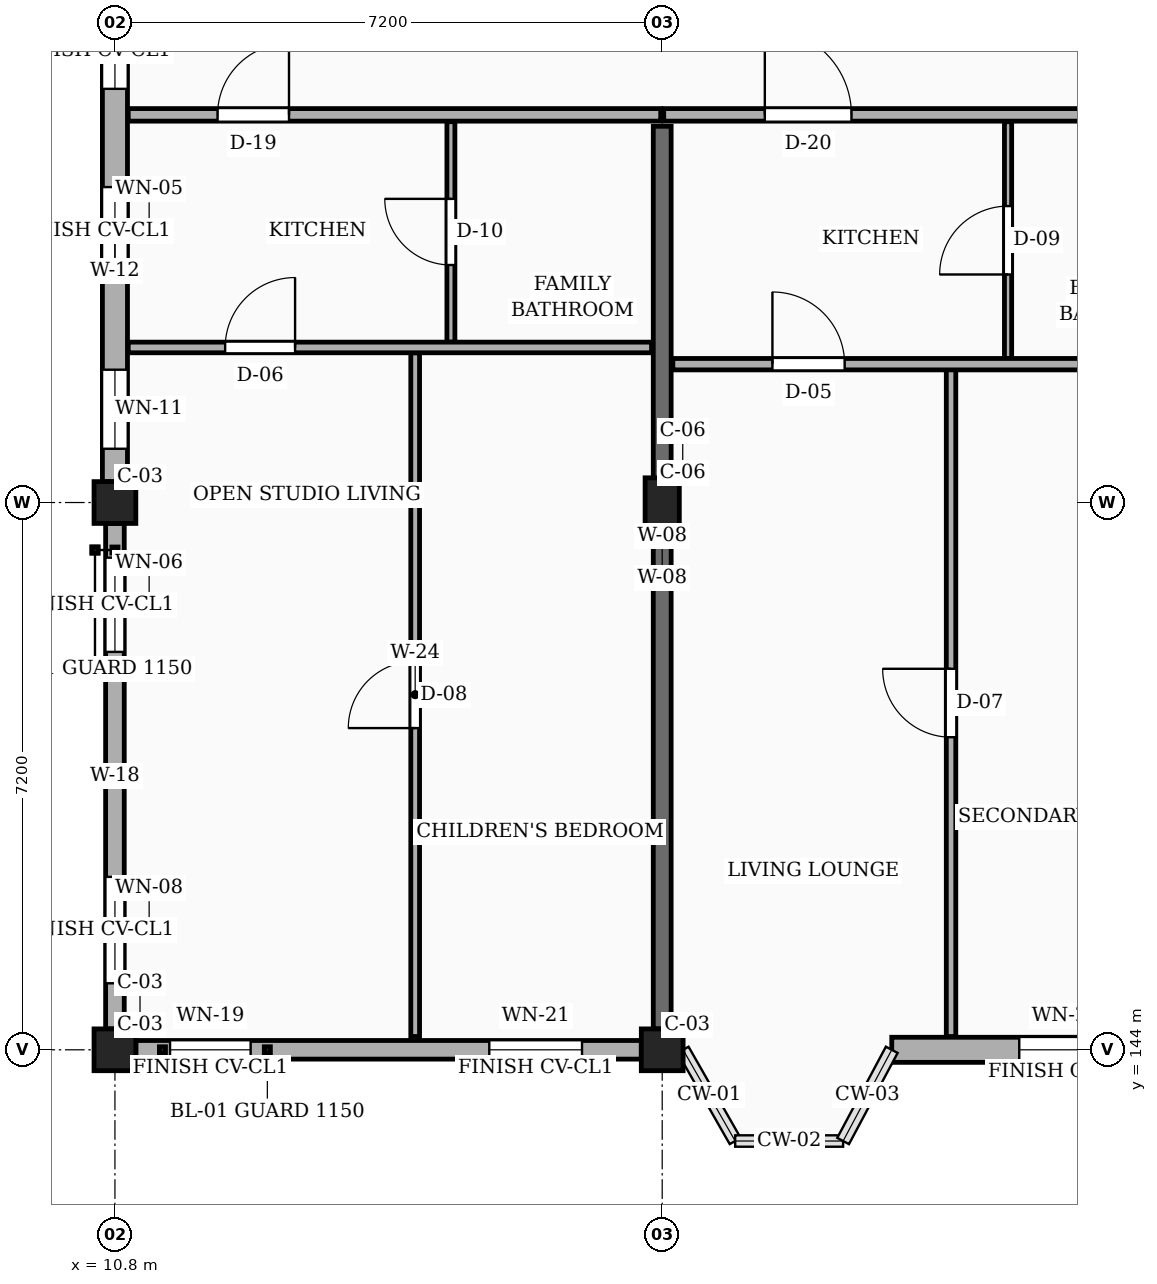
"""IFC4 building model, lengths in metres.
Left out: names, types, materials, properties, quantities, classifications, styles, units other than length and angle.
Written with IfcOpenShell. Run it as: python <this file> out.ifc"""

import sys

from ifc_helpers import new_model, si_unit, direction, frame, frame_2d, origin, origin_2d, place, context, subcontext, project, spatial, rectangle, extrude, element, fill, save


model = new_model("IFC4")
c1 = context("Model", 3, precision=1e-05, world=origin(), true_north=direction((0.0, 1.0)))
c2 = subcontext(c1, "Body", "Model", "MODEL_VIEW")
j1 = project(units=[si_unit("LENGTHUNIT", "METRE"), si_unit("PLANEANGLEUNIT", "RADIAN")], contexts=[c1])
p1 = place(None, origin())
s1 = spatial("IfcSite", under=j1, at=p1, CompositionType="ELEMENT")
p2 = place(p1, origin())
s2 = spatial("IfcBuilding", under=s1, at=p2, CompositionType="ELEMENT")
p3 = place(p2, frame((0.0, 0.0, 20.25)))
s3 = spatial("IfcBuildingStorey", under=s2, at=p3, CompositionType="ELEMENT", Elevation=20.25)
for number, where, z_axis, x_axis in (
    (1, (10.8, 144.0, 0.0), (0.0, 0.0, 1.0), (1.0, 0.0, 0.0)),
    (2, (10.8, 151.2, 0.0), (0.0, 0.0, 1.0), (1.0, 0.0, 0.0)),
    (3, (18.0, 144.0, 0.0), (0.0, 0.0, 1.0), (1.0, 0.0, 0.0)),
):
    element("IfcColumn", number, at=place(p3, frame(where, z_axis=z_axis, x_axis=x_axis)), inside=s3, PredefinedType="COLUMN", context=c2, shape_type="SweptSolid", body=[
        extrude(rectangle(XDim=0.55, YDim=0.55, at=origin_2d()), origin(), (0.0, 0.0, 1.0), 3.15),
    ])
p4 = place(p3, frame((18.0, 151.2, 0.0), z_axis=(0.0, 0.0, 1.0), x_axis=(1.0, 0.0, 0.0)))
e4 = element("IfcColumn", 4, at=p4, inside=s3, PredefinedType="COLUMN", context=c2, shape_type="SweptSolid", body=[
    extrude(rectangle(XDim=0.45, YDim=0.65, at=origin_2d()), origin(), (0.0, 0.0, 1.0), 3.15),
])
p5 = place(p3, frame((18.0, 144.275, 0.0), z_axis=(0.0, 0.0, 1.0), x_axis=(0.0, 1.0, 0.0)))
e5 = element("IfcWall", 5, at=p5, inside=s3, PredefinedType="SOLIDWALL", context=c2, shape_type="SweptSolid", body=[
    extrude(rectangle(XDim=11.875, YDim=0.235, at=frame_2d((5.938, 0.0))), origin(), (0.0, 0.0, 1.0), 2.185),
])
p6 = place(p3, frame((11.075, 144.0, 0.0), z_axis=(0.0, 0.0, 1.0), x_axis=(1.0, 0.0, 0.0)))
e6 = element("IfcWall", 6, at=p6, inside=s3, PredefinedType="SOLIDWALL", context=c2, shape_type="SweptSolid", body=[
    extrude(rectangle(XDim=6.65, YDim=0.245, at=frame_2d((3.325, 0.0))), origin(), (0.0, 0.0, 1.0), 2.455),
])
p7 = place(p6, frame((0.45, 0.0, 0.78)))
e7 = element("IfcOpeningElement", 7, at=p7, cuts=e6, PredefinedType="OPENING", context=c2, shape_type="SweptSolid", body=[
    extrude(rectangle(XDim=1.06, YDim=1.36, at=frame_2d((0.53, 0.68))), frame((0.0, 0.133, 0.0), z_axis=(0.0, -1.0, 0.0), x_axis=(1.0, 0.0, 0.0)), (0.0, 0.0, 1.0), 0.265),
])
p8 = place(p6, frame((4.65, 0.0, 0.78)))
e8 = element("IfcOpeningElement", 8, at=p8, cuts=e6, PredefinedType="OPENING", context=c2, shape_type="SweptSolid", body=[
    extrude(rectangle(XDim=1.22, YDim=1.36, at=frame_2d((0.61, 0.68))), frame((0.0, 0.133, 0.0), z_axis=(0.0, -1.0, 0.0), x_axis=(1.0, 0.0, 0.0)), (0.0, 0.0, 1.0), 0.265),
])
p9 = place(p3, frame((21.02, 144.0, 0.0), z_axis=(0.0, 0.0, 1.0), x_axis=(1.0, 0.0, 0.0)))
e9 = element("IfcWall", 9, at=p9, inside=s3, PredefinedType="SOLIDWALL", context=c2, shape_type="SweptSolid", body=[
    extrude(rectangle(XDim=3.905, YDim=0.33, at=frame_2d((1.953, 0.0))), origin(), (0.0, 0.0, 1.0), 2.455),
])
p10 = place(p9, frame((1.677, 0.0, 0.78)))
e10 = element("IfcOpeningElement", 10, at=p10, cuts=e9, PredefinedType="OPENING", context=c2, shape_type="SweptSolid", body=[
    extrude(rectangle(XDim=1.22, YDim=1.36, at=frame_2d((0.61, 0.68))), frame((0.0, 0.175, 0.0), z_axis=(0.0, -1.0, 0.0), x_axis=(1.0, 0.0, 0.0)), (0.0, 0.0, 1.0), 0.35),
])
p11 = place(p3, frame((10.8, 158.125, 0.0), z_axis=(0.0, 0.0, 1.0), x_axis=(0.0, -1.0, 0.0)))
e11 = element("IfcWall", 11, at=p11, inside=s3, PredefinedType="SOLIDWALL", context=c2, shape_type="SweptSolid", body=[
    extrude(rectangle(XDim=6.65, YDim=0.33, at=frame_2d((3.325, 0.0))), origin(), (0.0, 0.0, 1.0), 2.455),
])
p12 = place(p11, frame((0.482, 0.0, 0.78)))
e12 = element("IfcOpeningElement", 12, at=p12, cuts=e11, PredefinedType="OPENING", context=c2, shape_type="SweptSolid", body=[
    extrude(rectangle(XDim=1.0, YDim=1.15, at=frame_2d((0.5, 0.575))), frame((0.0, 0.175, 0.0), z_axis=(0.0, -1.0, 0.0), x_axis=(1.0, 0.0, 0.0)), (0.0, 0.0, 1.0), 0.35),
])
p13 = place(p11, frame((2.775, 0.0, 0.78)))
e13 = element("IfcOpeningElement", 13, at=p13, cuts=e11, PredefinedType="OPENING", context=c2, shape_type="SweptSolid", body=[
    extrude(rectangle(XDim=1.16, YDim=1.15, at=frame_2d((0.58, 0.575))), frame((0.0, 0.175, 0.0), z_axis=(0.0, -1.0, 0.0), x_axis=(1.0, 0.0, 0.0)), (0.0, 0.0, 1.0), 0.35),
])
p14 = place(p11, frame((5.177, 0.0, 0.78)))
e14 = element("IfcOpeningElement", 14, at=p14, cuts=e11, PredefinedType="OPENING", context=c2, shape_type="SweptSolid", body=[
    extrude(rectangle(XDim=1.04, YDim=1.26, at=frame_2d((0.52, 0.63))), frame((0.0, 0.175, 0.0), z_axis=(0.0, -1.0, 0.0), x_axis=(1.0, 0.0, 0.0)), (0.0, 0.0, 1.0), 0.35),
])
p15 = place(p3, frame((10.8, 150.925, 0.0), z_axis=(0.0, 0.0, 1.0), x_axis=(0.0, -1.0, 0.0)))
e15 = element("IfcWall", 15, at=p15, inside=s3, PredefinedType="SOLIDWALL", context=c2, shape_type="SweptSolid", body=[
    extrude(rectangle(XDim=6.65, YDim=0.245, at=frame_2d((3.325, 0.0))), origin(), (0.0, 0.0, 1.0), 2.455),
])
p16 = place(p15, frame((0.45, 0.0, 0.78)))
e16 = element("IfcOpeningElement", 16, at=p16, cuts=e15, PredefinedType="OPENING", context=c2, shape_type="SweptSolid", body=[
    extrude(rectangle(XDim=1.24, YDim=1.15, at=frame_2d((0.62, 0.575))), frame((0.0, 0.133, 0.0), z_axis=(0.0, -1.0, 0.0), x_axis=(1.0, 0.0, 0.0)), (0.0, 0.0, 1.0), 0.265),
])
p17 = place(p15, frame((4.65, 0.0, 0.78)))
e17 = element("IfcOpeningElement", 17, at=p17, cuts=e15, PredefinedType="OPENING", context=c2, shape_type="SweptSolid", body=[
    extrude(rectangle(XDim=1.4, YDim=1.15, at=frame_2d((0.7, 0.575))), frame((0.0, 0.133, 0.0), z_axis=(0.0, -1.0, 0.0), x_axis=(1.0, 0.0, 0.0)), (0.0, 0.0, 1.0), 0.265),
])
p18 = place(p3, frame((10.975, 156.3, 0.0), z_axis=(0.0, 0.0, 1.0), x_axis=(1.0, 0.0, 0.0)))
e18 = element("IfcWall", 18, at=p18, inside=s3, PredefinedType="PARTITIONING", context=c2, shape_type="SweptSolid", body=[
    extrude(rectangle(XDim=7.005, YDim=0.165, at=frame_2d((3.502, 0.0))), origin(), (0.0, 0.0, 1.0), 2.32),
])
p19 = place(p18, frame((1.175, 0.0, 0.0)))
e19 = element("IfcOpeningElement", 19, at=p19, cuts=e18, PredefinedType="OPENING", context=c2, shape_type="SweptSolid", body=[
    extrude(rectangle(XDim=0.94, YDim=2.12, at=frame_2d((0.47, 1.06))), frame((0.0, 0.093, 0.0), z_axis=(0.0, -1.0, 0.0), x_axis=(1.0, 0.0, 0.0)), (0.0, 0.0, 1.0), 0.185),
])
p20 = place(p3, frame((18.02, 156.3, 0.0), z_axis=(0.0, 0.0, 1.0), x_axis=(1.0, 0.0, 0.0)))
e20 = element("IfcWall", 20, at=p20, inside=s3, PredefinedType="PARTITIONING", context=c2, shape_type="SweptSolid", body=[
    extrude(rectangle(XDim=7.16, YDim=0.165, at=frame_2d((3.58, 0.0))), origin(), (0.0, 0.0, 1.0), 2.32),
])
p21 = place(p20, frame((1.33, 0.0, 0.0)))
e21 = element("IfcOpeningElement", 21, at=p21, cuts=e20, PredefinedType="OPENING", context=c2, shape_type="SweptSolid", body=[
    extrude(rectangle(XDim=1.14, YDim=2.18, at=frame_2d((0.57, 1.09))), frame((0.0, 0.093, 0.0), z_axis=(0.0, -1.0, 0.0), x_axis=(1.0, 0.0, 0.0)), (0.0, 0.0, 1.0), 0.185),
])
p22 = place(p3, frame((14.75, 144.175, 0.0), z_axis=(0.0, 0.0, 1.0), x_axis=(0.0, 1.0, 0.0)))
e22 = element("IfcWall", 22, at=p22, inside=s3, PredefinedType="PARTITIONING", context=c2, shape_type="SweptSolid", body=[
    extrude(rectangle(XDim=8.995, YDim=0.115, at=frame_2d((4.498, 0.0))), origin(), (0.0, 0.0, 1.0), 2.32),
])
p23 = place(p22, frame((4.058, 0.0, 0.0)))
e23 = element("IfcOpeningElement", 23, at=p23, cuts=e22, PredefinedType="OPENING", context=c2, shape_type="SweptSolid", body=[
    extrude(rectangle(XDim=0.88, YDim=2.08, at=frame_2d((0.44, 1.04))), frame((0.0, 0.067, 0.0), z_axis=(0.0, -1.0, 0.0), x_axis=(1.0, 0.0, 0.0)), (0.0, 0.0, 1.0), 0.135),
])
p24 = place(p3, frame((15.22, 153.31, 0.0), z_axis=(0.0, 0.0, 1.0), x_axis=(0.0, 1.0, 0.0)))
e24 = element("IfcWall", 24, at=p24, inside=s3, PredefinedType="PARTITIONING", context=c2, shape_type="SweptSolid", body=[
    extrude(rectangle(XDim=2.9, YDim=0.105, at=frame_2d((1.45, 0.0))), origin(), (0.0, 0.0, 1.0), 2.32),
])
p25 = place(p24, frame((1.015, 0.0, 0.0)))
e25 = element("IfcOpeningElement", 25, at=p25, cuts=e24, PredefinedType="OPENING", context=c2, shape_type="SweptSolid", body=[
    extrude(rectangle(XDim=0.87, YDim=2.05, at=frame_2d((0.435, 1.025))), frame((0.0, 0.062, 0.0), z_axis=(0.0, -1.0, 0.0), x_axis=(1.0, 0.0, 0.0)), (0.0, 0.0, 1.0), 0.125),
])
p26 = place(p3, frame((10.975, 153.24, 0.0), z_axis=(0.0, 0.0, 1.0), x_axis=(1.0, 0.0, 0.0)))
e26 = element("IfcWall", 26, at=p26, inside=s3, PredefinedType="PARTITIONING", context=c2, shape_type="SweptSolid", body=[
    extrude(rectangle(XDim=6.885, YDim=0.14, at=frame_2d((3.442, 0.0))), origin(), (0.0, 0.0, 1.0), 2.32),
])
p27 = place(p26, frame((1.275, 0.0, 0.0)))
e27 = element("IfcOpeningElement", 27, at=p27, cuts=e26, PredefinedType="OPENING", context=c2, shape_type="SweptSolid", body=[
    extrude(rectangle(XDim=0.92, YDim=2.1, at=frame_2d((0.46, 1.05))), frame((0.0, 0.08, 0.0), z_axis=(0.0, -1.0, 0.0), x_axis=(1.0, 0.0, 0.0)), (0.0, 0.0, 1.0), 0.16),
])
p28 = place(p3, frame((21.8, 144.175, 0.0), z_axis=(0.0, 0.0, 1.0), x_axis=(0.0, 1.0, 0.0)))
e28 = element("IfcWall", 28, at=p28, inside=s3, PredefinedType="PARTITIONING", context=c2, shape_type="SweptSolid", body=[
    extrude(rectangle(XDim=8.775, YDim=0.125, at=frame_2d((4.387, 0.0))), origin(), (0.0, 0.0, 1.0), 2.32),
])
p29 = place(p28, frame((3.938, 0.0, 0.0)))
e29 = element("IfcOpeningElement", 29, at=p29, cuts=e28, PredefinedType="OPENING", context=c2, shape_type="SweptSolid", body=[
    extrude(rectangle(XDim=0.9, YDim=2.1, at=frame_2d((0.45, 1.05))), frame((0.0, 0.073, 0.0), z_axis=(0.0, -1.0, 0.0), x_axis=(1.0, 0.0, 0.0)), (0.0, 0.0, 1.0), 0.145),
])
p30 = place(p3, frame((22.55, 153.09, 0.0), z_axis=(0.0, 0.0, 1.0), x_axis=(0.0, 1.0, 0.0)))
e30 = element("IfcWall", 30, at=p30, inside=s3, PredefinedType="PARTITIONING", context=c2, shape_type="SweptSolid", body=[
    extrude(rectangle(XDim=3.12, YDim=0.095, at=frame_2d((1.56, 0.0))), origin(), (0.0, 0.0, 1.0), 2.32),
])
p31 = place(p30, frame((1.11, 0.0, 0.0)))
e31 = element("IfcOpeningElement", 31, at=p31, cuts=e30, PredefinedType="OPENING", context=c2, shape_type="SweptSolid", body=[
    extrude(rectangle(XDim=0.9, YDim=2.05, at=frame_2d((0.45, 1.025))), frame((0.0, 0.058, 0.0), z_axis=(0.0, -1.0, 0.0), x_axis=(1.0, 0.0, 0.0)), (0.0, 0.0, 1.0), 0.115),
])
p32 = place(p3, frame((18.14, 153.02, 0.0), z_axis=(0.0, 0.0, 1.0), x_axis=(1.0, 0.0, 0.0)))
e32 = element("IfcWall", 32, at=p32, inside=s3, PredefinedType="PARTITIONING", context=c2, shape_type="SweptSolid", body=[
    extrude(rectangle(XDim=6.92, YDim=0.15, at=frame_2d((3.46, 0.0))), origin(), (0.0, 0.0, 1.0), 2.32),
])
p33 = place(p32, frame((1.31, 0.0, 0.0)))
e33 = element("IfcOpeningElement", 33, at=p33, cuts=e32, PredefinedType="OPENING", context=c2, shape_type="SweptSolid", body=[
    extrude(rectangle(XDim=0.95, YDim=2.1, at=frame_2d((0.475, 1.05))), frame((0.0, 0.085, 0.0), z_axis=(0.0, -1.0, 0.0), x_axis=(1.0, 0.0, 0.0)), (0.0, 0.0, 1.0), 0.17),
])
p34 = place(p7, origin())
e34 = element("IfcWindow", 34, at=p34, inside=s3, PartitioningType="SINGLE_PANEL", PredefinedType="WINDOW", context=c2, shape_type="SweptSolid", body=[
    extrude(rectangle(XDim=1.06, YDim=1.36, at=frame_2d((0.53, 0.68))), frame((0.0, 0.03, 0.0), z_axis=(0.0, -1.0, 0.0), x_axis=(1.0, 0.0, 0.0)), (0.0, 0.0, 1.0), 0.06),
])
fill(e7, e34)
p35 = place(p8, origin())
e35 = element("IfcWindow", 35, at=p35, inside=s3, PartitioningType="SINGLE_PANEL", PredefinedType="WINDOW", context=c2, shape_type="SweptSolid", body=[
    extrude(rectangle(XDim=1.22, YDim=1.36, at=frame_2d((0.61, 0.68))), frame((0.0, 0.03, 0.0), z_axis=(0.0, -1.0, 0.0), x_axis=(1.0, 0.0, 0.0)), (0.0, 0.0, 1.0), 0.06),
])
fill(e8, e35)
p36 = place(p10, origin())
e36 = element("IfcWindow", 36, at=p36, inside=s3, PartitioningType="SINGLE_PANEL", PredefinedType="WINDOW", context=c2, shape_type="SweptSolid", body=[
    extrude(rectangle(XDim=1.22, YDim=1.36, at=frame_2d((0.61, 0.68))), frame((0.0, 0.03, 0.0), z_axis=(0.0, -1.0, 0.0), x_axis=(1.0, 0.0, 0.0)), (0.0, 0.0, 1.0), 0.06),
])
fill(e10, e36)
p37 = place(p12, origin())
e37 = element("IfcWindow", 37, at=p37, inside=s3, PartitioningType="SINGLE_PANEL", PredefinedType="WINDOW", context=c2, shape_type="SweptSolid", body=[
    extrude(rectangle(XDim=1.0, YDim=1.15, at=frame_2d((0.5, 0.575))), frame((0.0, 0.03, 0.0), z_axis=(0.0, -1.0, 0.0), x_axis=(1.0, 0.0, 0.0)), (0.0, 0.0, 1.0), 0.06),
])
fill(e12, e37)
p38 = place(p13, origin())
e38 = element("IfcWindow", 38, at=p38, inside=s3, PartitioningType="SINGLE_PANEL", PredefinedType="WINDOW", context=c2, shape_type="SweptSolid", body=[
    extrude(rectangle(XDim=1.16, YDim=1.15, at=frame_2d((0.58, 0.575))), frame((0.0, 0.03, 0.0), z_axis=(0.0, -1.0, 0.0), x_axis=(1.0, 0.0, 0.0)), (0.0, 0.0, 1.0), 0.06),
])
fill(e13, e38)
p39 = place(p14, origin())
e39 = element("IfcWindow", 39, at=p39, inside=s3, PartitioningType="SINGLE_PANEL", PredefinedType="WINDOW", context=c2, shape_type="SweptSolid", body=[
    extrude(rectangle(XDim=1.04, YDim=1.26, at=frame_2d((0.52, 0.63))), frame((0.0, 0.03, 0.0), z_axis=(0.0, -1.0, 0.0), x_axis=(1.0, 0.0, 0.0)), (0.0, 0.0, 1.0), 0.06),
])
fill(e14, e39)
p40 = place(p16, origin())
e40 = element("IfcWindow", 40, at=p40, inside=s3, PartitioningType="SINGLE_PANEL", PredefinedType="WINDOW", context=c2, shape_type="SweptSolid", body=[
    extrude(rectangle(XDim=1.24, YDim=1.15, at=frame_2d((0.62, 0.575))), frame((0.0, 0.03, 0.0), z_axis=(0.0, -1.0, 0.0), x_axis=(1.0, 0.0, 0.0)), (0.0, 0.0, 1.0), 0.06),
])
fill(e16, e40)
p41 = place(p17, origin())
e41 = element("IfcWindow", 41, at=p41, inside=s3, PartitioningType="SINGLE_PANEL", PredefinedType="WINDOW", context=c2, shape_type="SweptSolid", body=[
    extrude(rectangle(XDim=1.4, YDim=1.15, at=frame_2d((0.7, 0.575))), frame((0.0, 0.03, 0.0), z_axis=(0.0, -1.0, 0.0), x_axis=(1.0, 0.0, 0.0)), (0.0, 0.0, 1.0), 0.06),
])
fill(e17, e41)
p42 = place(p19, origin())
e42 = element("IfcDoor", 42, at=p42, inside=s3, OperationType="SINGLE_SWING_RIGHT", PredefinedType="DOOR", context=c2, shape_type="SweptSolid", body=[
    extrude(rectangle(XDim=0.94, YDim=2.12, at=frame_2d((0.47, 1.06))), frame((0.0, 0.025, 0.0), z_axis=(0.0, -1.0, 0.0), x_axis=(1.0, 0.0, 0.0)), (0.0, 0.0, 1.0), 0.05),
])
fill(e19, e42)
p43 = place(p21, origin())
e43 = element("IfcDoor", 43, at=p43, inside=s3, OperationType="SINGLE_SWING_LEFT", PredefinedType="DOOR", context=c2, shape_type="SweptSolid", body=[
    extrude(rectangle(XDim=1.14, YDim=2.18, at=frame_2d((0.57, 1.09))), frame((0.0, 0.025, 0.0), z_axis=(0.0, -1.0, 0.0), x_axis=(1.0, 0.0, 0.0)), (0.0, 0.0, 1.0), 0.05),
])
fill(e21, e43)
p44 = place(p23, origin())
e44 = element("IfcDoor", 44, at=p44, inside=s3, OperationType="SINGLE_SWING_LEFT", PredefinedType="DOOR", context=c2, shape_type="SweptSolid", body=[
    extrude(rectangle(XDim=0.88, YDim=2.08, at=frame_2d((0.44, 1.04))), frame((0.0, 0.025, 0.0), z_axis=(0.0, -1.0, 0.0), x_axis=(1.0, 0.0, 0.0)), (0.0, 0.0, 1.0), 0.05),
])
fill(e23, e44)
p45 = place(p25, origin())
e45 = element("IfcDoor", 45, at=p45, inside=s3, OperationType="SINGLE_SWING_RIGHT", PredefinedType="DOOR", context=c2, shape_type="SweptSolid", body=[
    extrude(rectangle(XDim=0.87, YDim=2.05, at=frame_2d((0.435, 1.025))), frame((0.0, 0.025, 0.0), z_axis=(0.0, -1.0, 0.0), x_axis=(1.0, 0.0, 0.0)), (0.0, 0.0, 1.0), 0.05),
])
fill(e25, e45)
p46 = place(p27, origin())
e46 = element("IfcDoor", 46, at=p46, inside=s3, OperationType="SINGLE_SWING_RIGHT", PredefinedType="DOOR", context=c2, shape_type="SweptSolid", body=[
    extrude(rectangle(XDim=0.92, YDim=2.1, at=frame_2d((0.46, 1.05))), frame((0.0, 0.025, 0.0), z_axis=(0.0, -1.0, 0.0), x_axis=(1.0, 0.0, 0.0)), (0.0, 0.0, 1.0), 0.05),
])
fill(e27, e46)
p47 = place(p29, origin())
e47 = element("IfcDoor", 47, at=p47, inside=s3, OperationType="SINGLE_SWING_RIGHT", PredefinedType="DOOR", context=c2, shape_type="SweptSolid", body=[
    extrude(rectangle(XDim=0.9, YDim=2.1, at=frame_2d((0.45, 1.05))), frame((0.0, 0.025, 0.0), z_axis=(0.0, -1.0, 0.0), x_axis=(1.0, 0.0, 0.0)), (0.0, 0.0, 1.0), 0.05),
])
fill(e29, e47)
p48 = place(p31, origin())
e48 = element("IfcDoor", 48, at=p48, inside=s3, OperationType="SINGLE_SWING_LEFT", PredefinedType="DOOR", context=c2, shape_type="SweptSolid", body=[
    extrude(rectangle(XDim=0.9, YDim=2.05, at=frame_2d((0.45, 1.025))), frame((0.0, 0.025, 0.0), z_axis=(0.0, -1.0, 0.0), x_axis=(1.0, 0.0, 0.0)), (0.0, 0.0, 1.0), 0.05),
])
fill(e31, e48)
p49 = place(p33, origin())
e49 = element("IfcDoor", 49, at=p49, inside=s3, OperationType="SINGLE_SWING_LEFT", PredefinedType="DOOR", context=c2, shape_type="SweptSolid", body=[
    extrude(rectangle(XDim=0.95, YDim=2.1, at=frame_2d((0.475, 1.05))), frame((0.0, 0.025, 0.0), z_axis=(0.0, -1.0, 0.0), x_axis=(1.0, 0.0, 0.0)), (0.0, 0.0, 1.0), 0.05),
])
fill(e33, e49)
save(model, sys.argv[1])
